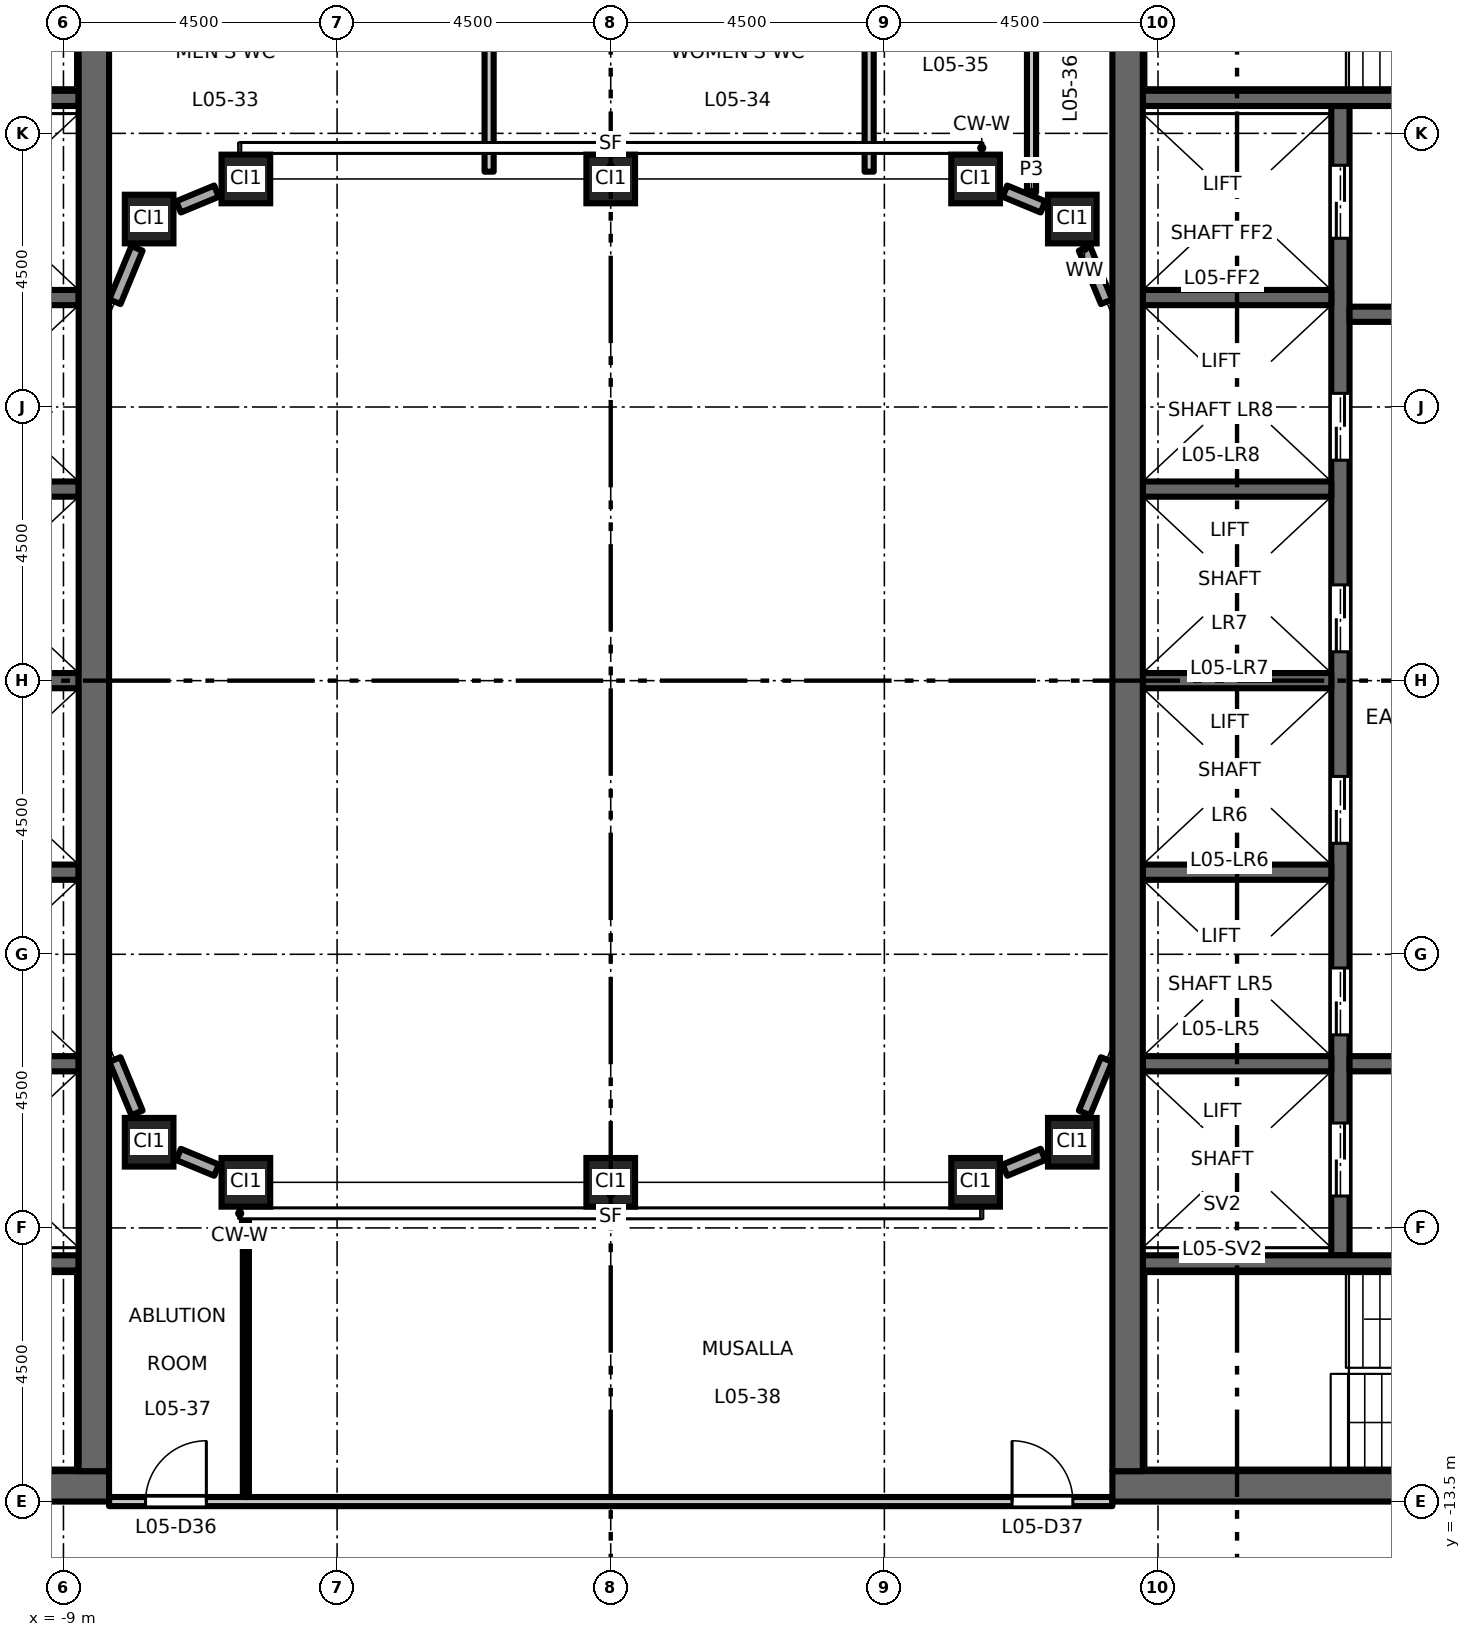
"""IFC4 building model, lengths in metres.
Left out: names, types, materials, properties, quantities, classifications, styles, units other than length and angle.
Written with IfcOpenShell. Run it as: python <this file> out.ifc"""

import sys

from ifc_helpers import new_model, si_unit, direction, frame, frame_2d, origin, origin_2d, place, context, subcontext, project, spatial, rectangle, hollow_rectangle, extrude, element, fill, save


model = new_model("IFC4")
c1 = context("Model", 3, precision=1e-05, world=origin(), true_north=direction((0.0, 1.0)))
c2 = subcontext(c1, "Body", "Model", "MODEL_VIEW")
j1 = project(units=[si_unit("LENGTHUNIT", "METRE"), si_unit("PLANEANGLEUNIT", "RADIAN")], contexts=[c1])
p1 = place(None, origin())
s1 = spatial("IfcSite", under=j1, at=p1, CompositionType="ELEMENT")
p2 = place(p1, origin())
s2 = spatial("IfcBuilding", under=s1, at=p2, CompositionType="ELEMENT")
p3 = place(p2, frame((0.0, 0.0, 26.7)))
s3 = spatial("IfcBuildingStorey", under=s2, at=p3, CompositionType="ELEMENT", Elevation=26.7)
for number, where, z_axis, x_axis in (
    (1, (-7.591, -7.591, 0.0), (0.0, 0.0, 1.0), (1.0, 0.0, 0.0)),
    (2, (-6.0, -8.25, 0.0), (0.0, 0.0, 1.0), (1.0, 0.0, 0.0)),
    (3, (0.0, -8.25, 0.0), (0.0, 0.0, 1.0), (1.0, 0.0, 0.0)),
    (4, (6.0, -8.25, 0.0), (0.0, 0.0, 1.0), (1.0, 0.0, 0.0)),
    (5, (7.591, -7.591, 0.0), (0.0, 0.0, 1.0), (1.0, 0.0, 0.0)),
    (6, (-7.591, 7.591, 0.0), (0.0, 0.0, 1.0), (1.0, 0.0, 0.0)),
    (7, (-6.0, 8.25, 0.0), (0.0, 0.0, 1.0), (1.0, 0.0, 0.0)),
    (8, (0.0, 8.25, 0.0), (0.0, 0.0, 1.0), (1.0, 0.0, 0.0)),
    (9, (6.0, 8.25, 0.0), (0.0, 0.0, 1.0), (1.0, 0.0, 0.0)),
    (10, (7.591, 7.591, 0.0), (0.0, 0.0, 1.0), (1.0, 0.0, 0.0)),
):
    element("IfcColumn", number, at=place(p3, frame(where, z_axis=z_axis, x_axis=x_axis)), inside=s3, PredefinedType="COLUMN", context=c2, shape_type="SweptSolid", body=[
        extrude(hollow_rectangle(XDim=0.8, YDim=0.8, WallThickness=0.05, at=origin_2d()), origin(), (0.0, 0.0, 1.0), 4.5),
    ])
for number, where, z_axis, x_axis in (
    (11, (-8.75, 0.0, 0.0), (0.0, 0.0, 1.0), (-1.0, 0.0, 0.0)),
    (12, (-8.75, 3.15, 0.0), (0.0, 0.0, 1.0), (-1.0, 0.0, 0.0)),
    (13, (-8.75, 6.3, 0.0), (0.0, 0.0, 1.0), (-1.0, 0.0, 0.0)),
    (14, (-8.75, -3.15, 0.0), (0.0, 0.0, 1.0), (-1.0, 0.0, 0.0)),
    (15, (-8.75, -6.3, 0.0), (0.0, 0.0, 1.0), (-1.0, 0.0, 0.0)),
):
    element("IfcWall", number, at=place(p3, frame(where, z_axis=z_axis, x_axis=x_axis)), inside=s3, PredefinedType="SHEAR", context=c2, shape_type="SweptSolid", body=[
        extrude(rectangle(XDim=3.1, YDim=0.25, at=frame_2d((1.55, 0.0))), origin(), (0.0, 0.0, 1.0), 4.35),
    ])
p4 = place(p3, frame((-8.75, 9.575, 0.0), z_axis=(0.0, 0.0, 1.0), x_axis=(-1.0, 0.0, 0.0)))
e16 = element("IfcWall", 16, at=p4, inside=s3, PredefinedType="SHEAR", context=c2, shape_type="SweptSolid", body=[
    extrude(rectangle(XDim=8.0, YDim=0.25, at=frame_2d((4.0, 0.0))), origin(), (0.0, 0.0, 1.0), 4.35),
])
p5 = place(p4, frame((6.65, 0.0, 0.0)))
e17 = element("IfcOpeningElement", 17, at=p5, cuts=e16, PredefinedType="OPENING", context=c2, shape_type="SweptSolid", body=[
    extrude(rectangle(XDim=1.1, YDim=2.1, at=frame_2d((0.55, 1.05))), frame((0.0, 0.135, 0.0), z_axis=(0.0, -1.0, 0.0), x_axis=(1.0, 0.0, 0.0)), (0.0, 0.0, 1.0), 0.27),
])
p6 = place(p3, frame((-8.75, -9.575, 0.0), z_axis=(0.0, 0.0, 1.0), x_axis=(-1.0, 0.0, 0.0)))
e18 = element("IfcWall", 18, at=p6, inside=s3, PredefinedType="SHEAR", context=c2, shape_type="SweptSolid", body=[
    extrude(rectangle(XDim=8.0, YDim=0.25, at=frame_2d((4.0, 0.0))), origin(), (0.0, 0.0, 1.0), 4.35),
])
p7 = place(p6, frame((6.65, 0.0, 0.0)))
e19 = element("IfcOpeningElement", 19, at=p7, cuts=e18, PredefinedType="OPENING", context=c2, shape_type="SweptSolid", body=[
    extrude(rectangle(XDim=1.1, YDim=2.1, at=frame_2d((0.55, 1.05))), frame((0.0, 0.135, 0.0), z_axis=(0.0, -1.0, 0.0), x_axis=(1.0, 0.0, 0.0)), (0.0, 0.0, 1.0), 0.27),
])
p8 = place(p3, frame((-8.25, -13.25, 0.0), z_axis=(0.0, 0.0, 1.0), x_axis=(-1.0, 0.0, 0.0)))
e20 = element("IfcWall", 20, at=p8, inside=s3, PredefinedType="SHEAR", context=c2, shape_type="SweptSolid", body=[
    extrude(rectangle(XDim=13.5, YDim=0.5, at=frame_2d((6.75, 0.0))), origin(), (0.0, 0.0, 1.0), 4.35),
])
p9 = place(p3, frame((-8.5, -13.0, 0.0), z_axis=(0.0, 0.0, 1.0), x_axis=(0.0, 1.0, 0.0)))
e21 = element("IfcWall", 21, at=p9, inside=s3, PredefinedType="SHEAR", context=c2, shape_type="SweptSolid", body=[
    extrude(rectangle(XDim=26.0, YDim=0.5, at=frame_2d((13.0, 0.0))), origin(), (0.0, 0.0, 1.0), 4.35),
])
p10 = place(p3, frame((12.0, -9.45, 0.0), z_axis=(0.0, 0.0, 1.0), x_axis=(0.0, 1.0, 0.0)))
e22 = element("IfcWall", 22, at=p10, inside=s3, PredefinedType="SHEAR", context=c2, shape_type="SweptSolid", body=[
    extrude(rectangle(XDim=18.9, YDim=0.3, at=frame_2d((9.45, 0.0))), origin(), (0.0, 0.0, 1.0), 4.35),
])
p11 = place(p10, frame((3.625, 0.0, 0.0)))
e23 = element("IfcOpeningElement", 23, at=p11, cuts=e22, PredefinedType="OPENING", context=c2, shape_type="SweptSolid", body=[
    extrude(rectangle(XDim=1.1, YDim=2.1, at=frame_2d((0.55, 1.05))), frame((0.0, 0.16, 0.0), z_axis=(0.0, -1.0, 0.0), x_axis=(1.0, 0.0, 0.0)), (0.0, 0.0, 1.0), 0.32),
])
p12 = place(p10, frame((6.775, 0.0, 0.0)))
e24 = element("IfcOpeningElement", 24, at=p12, cuts=e22, PredefinedType="OPENING", context=c2, shape_type="SweptSolid", body=[
    extrude(rectangle(XDim=1.1, YDim=2.1, at=frame_2d((0.55, 1.05))), frame((0.0, 0.16, 0.0), z_axis=(0.0, -1.0, 0.0), x_axis=(1.0, 0.0, 0.0)), (0.0, 0.0, 1.0), 0.32),
])
p13 = place(p10, frame((9.925, 0.0, 0.0)))
e25 = element("IfcOpeningElement", 25, at=p13, cuts=e22, PredefinedType="OPENING", context=c2, shape_type="SweptSolid", body=[
    extrude(rectangle(XDim=1.1, YDim=2.1, at=frame_2d((0.55, 1.05))), frame((0.0, 0.16, 0.0), z_axis=(0.0, -1.0, 0.0), x_axis=(1.0, 0.0, 0.0)), (0.0, 0.0, 1.0), 0.32),
])
p14 = place(p10, frame((13.075, 0.0, 0.0)))
e26 = element("IfcOpeningElement", 26, at=p14, cuts=e22, PredefinedType="OPENING", context=c2, shape_type="SweptSolid", body=[
    extrude(rectangle(XDim=1.1, YDim=2.1, at=frame_2d((0.55, 1.05))), frame((0.0, 0.16, 0.0), z_axis=(0.0, -1.0, 0.0), x_axis=(1.0, 0.0, 0.0)), (0.0, 0.0, 1.0), 0.32),
])
p15 = place(p10, frame((16.725, 0.0, 0.0)))
e27 = element("IfcOpeningElement", 27, at=p15, cuts=e22, PredefinedType="OPENING", context=c2, shape_type="SweptSolid", body=[
    extrude(rectangle(XDim=1.2, YDim=2.1, at=frame_2d((0.6, 1.05))), frame((0.0, 0.16, 0.0), z_axis=(0.0, -1.0, 0.0), x_axis=(1.0, 0.0, 0.0)), (0.0, 0.0, 1.0), 0.32),
])
p16 = place(p10, frame((0.975, 0.0, 0.0)))
e28 = element("IfcOpeningElement", 28, at=p16, cuts=e22, PredefinedType="OPENING", context=c2, shape_type="SweptSolid", body=[
    extrude(rectangle(XDim=1.2, YDim=2.1, at=frame_2d((0.6, 1.05))), frame((0.0, 0.16, 0.0), z_axis=(0.0, -1.0, 0.0), x_axis=(1.0, 0.0, 0.0)), (0.0, 0.0, 1.0), 0.32),
])
p17 = place(p3, frame((12.15, 6.025, 0.0), z_axis=(0.0, 0.0, 1.0), x_axis=(1.0, 0.0, 0.0)))
e29 = element("IfcWall", 29, at=p17, inside=s3, PredefinedType="SHEAR", context=c2, shape_type="SweptSolid", body=[
    extrude(rectangle(XDim=4.6, YDim=0.25, at=frame_2d((2.3, 0.0))), origin(), (0.0, 0.0, 1.0), 4.35),
])
p18 = place(p17, frame((1.8, 0.0, 0.0)))
e30 = element("IfcOpeningElement", 30, at=p18, cuts=e29, PredefinedType="OPENING", context=c2, shape_type="SweptSolid", body=[
    extrude(rectangle(XDim=1.0, YDim=2.1, at=frame_2d((0.5, 1.05))), frame((0.0, 0.135, 0.0), z_axis=(0.0, -1.0, 0.0), x_axis=(1.0, 0.0, 0.0)), (0.0, 0.0, 1.0), 0.27),
])
p19 = place(p3, frame((12.15, -6.3, 0.0), z_axis=(0.0, 0.0, 1.0), x_axis=(1.0, 0.0, 0.0)))
e31 = element("IfcWall", 31, at=p19, inside=s3, PredefinedType="SHEAR", context=c2, shape_type="SweptSolid", body=[
    extrude(rectangle(XDim=9.1, YDim=0.25, at=frame_2d((4.55, 0.0))), origin(), (0.0, 0.0, 1.0), 4.35),
])
p20 = place(p19, frame((1.8, 0.0, 0.0)))
e32 = element("IfcOpeningElement", 32, at=p20, cuts=e31, PredefinedType="OPENING", context=c2, shape_type="SweptSolid", body=[
    extrude(rectangle(XDim=1.0, YDim=2.1, at=frame_2d((0.5, 1.05))), frame((0.0, 0.135, 0.0), z_axis=(0.0, -1.0, 0.0), x_axis=(1.0, 0.0, 0.0)), (0.0, 0.0, 1.0), 0.27),
])
p21 = place(p19, frame((6.65, 0.0, 0.0)))
e33 = element("IfcOpeningElement", 33, at=p21, cuts=e31, PredefinedType="OPENING", context=c2, shape_type="SweptSolid", body=[
    extrude(rectangle(XDim=0.9, YDim=2.1, at=frame_2d((0.45, 1.05))), frame((0.0, 0.135, 0.0), z_axis=(0.0, -1.0, 0.0), x_axis=(1.0, 0.0, 0.0)), (0.0, 0.0, 1.0), 0.27),
])
for number, where, z_axis, x_axis in (
    (34, (8.75, 0.0, 0.0), (0.0, 0.0, 1.0), (1.0, 0.0, 0.0)),
    (35, (8.75, 3.15, 0.0), (0.0, 0.0, 1.0), (1.0, 0.0, 0.0)),
    (36, (8.75, 6.3, 0.0), (0.0, 0.0, 1.0), (1.0, 0.0, 0.0)),
    (37, (8.75, -3.15, 0.0), (0.0, 0.0, 1.0), (1.0, 0.0, 0.0)),
    (38, (8.75, -6.3, 0.0), (0.0, 0.0, 1.0), (1.0, 0.0, 0.0)),
):
    element("IfcWall", number, at=place(p3, frame(where, z_axis=z_axis, x_axis=x_axis)), inside=s3, PredefinedType="SHEAR", context=c2, shape_type="SweptSolid", body=[
        extrude(rectangle(XDim=3.1, YDim=0.25, at=frame_2d((1.55, 0.0))), origin(), (0.0, 0.0, 1.0), 4.35),
    ])
p22 = place(p3, frame((8.75, 9.575, 0.0), z_axis=(0.0, 0.0, 1.0), x_axis=(1.0, 0.0, 0.0)))
e39 = element("IfcWall", 39, at=p22, inside=s3, PredefinedType="SHEAR", context=c2, shape_type="SweptSolid", body=[
    extrude(rectangle(XDim=8.0, YDim=0.25, at=frame_2d((4.0, 0.0))), origin(), (0.0, 0.0, 1.0), 4.35),
])
p23 = place(p22, frame((6.65, 0.0, 0.0)))
e40 = element("IfcOpeningElement", 40, at=p23, cuts=e39, PredefinedType="OPENING", context=c2, shape_type="SweptSolid", body=[
    extrude(rectangle(XDim=1.1, YDim=2.1, at=frame_2d((0.55, 1.05))), frame((0.0, 0.135, 0.0), z_axis=(0.0, -1.0, 0.0), x_axis=(1.0, 0.0, 0.0)), (0.0, 0.0, 1.0), 0.27),
])
p24 = place(p3, frame((8.75, -9.575, 0.0), z_axis=(0.0, 0.0, 1.0), x_axis=(1.0, 0.0, 0.0)))
e41 = element("IfcWall", 41, at=p24, inside=s3, PredefinedType="SHEAR", context=c2, shape_type="SweptSolid", body=[
    extrude(rectangle(XDim=8.0, YDim=0.25, at=frame_2d((4.0, 0.0))), origin(), (0.0, 0.0, 1.0), 4.35),
])
p25 = place(p24, frame((6.65, 0.0, 0.0)))
e42 = element("IfcOpeningElement", 42, at=p25, cuts=e41, PredefinedType="OPENING", context=c2, shape_type="SweptSolid", body=[
    extrude(rectangle(XDim=1.1, YDim=2.1, at=frame_2d((0.55, 1.05))), frame((0.0, 0.135, 0.0), z_axis=(0.0, -1.0, 0.0), x_axis=(1.0, 0.0, 0.0)), (0.0, 0.0, 1.0), 0.27),
])
p26 = place(p3, frame((8.25, -13.25, 0.0), z_axis=(0.0, 0.0, 1.0), x_axis=(1.0, 0.0, 0.0)))
e43 = element("IfcWall", 43, at=p26, inside=s3, PredefinedType="SHEAR", context=c2, shape_type="SweptSolid", body=[
    extrude(rectangle(XDim=13.5, YDim=0.5, at=frame_2d((6.75, 0.0))), origin(), (0.0, 0.0, 1.0), 4.35),
])
p27 = place(p3, frame((8.5, -13.0, 0.0), z_axis=(0.0, 0.0, 1.0), x_axis=(0.0, 1.0, 0.0)))
e44 = element("IfcWall", 44, at=p27, inside=s3, PredefinedType="SHEAR", context=c2, shape_type="SweptSolid", body=[
    extrude(rectangle(XDim=26.0, YDim=0.5, at=frame_2d((13.0, 0.0))), origin(), (0.0, 0.0, 1.0), 4.35),
])
p28 = place(p3, frame((6.483, -8.05, 0.0), z_axis=(0.0, 0.0, 1.0), x_axis=(0.923854141361, 0.382744726273, 0.0)))
e45 = element("IfcWall", 45, at=p28, inside=s3, PredefinedType="STANDARD", context=c2, shape_type="SweptSolid", body=[
    extrude(rectangle(XDim=0.677, YDim=0.2, at=frame_2d((0.338, 0.0))), origin(), (0.0, 0.0, 1.0), 3.73),
])
for number, where, z_axis, x_axis in (
    (46, (7.791, -7.108, 0.0), (0.0, 0.0, 1.0), (0.383, 0.924, 0.0)),
    (47, (8.154, 6.231, 0.0), (0.0, 0.0, 1.0), (-0.383, 0.924, 0.0)),
):
    element("IfcWall", number, at=place(p3, frame(where, z_axis=z_axis, x_axis=x_axis)), inside=s3, PredefinedType="STANDARD", context=c2, shape_type="SweptSolid", body=[
        extrude(rectangle(XDim=0.949, YDim=0.2, at=frame_2d((0.475, 0.0))), origin(), (0.0, 0.0, 1.0), 3.73),
    ])
for number, where, z_axis, x_axis in (
    (48, (7.108, 7.791, 0.0), (0.0, 0.0, 1.0), (-0.924, 0.383, 0.0)),
    (49, (-6.483, 8.05, 0.0), (0.0, 0.0, 1.0), (-0.924, -0.383, 0.0)),
):
    element("IfcWall", number, at=place(p3, frame(where, z_axis=z_axis, x_axis=x_axis)), inside=s3, PredefinedType="STANDARD", context=c2, shape_type="SweptSolid", body=[
        extrude(rectangle(XDim=0.677, YDim=0.2, at=frame_2d((0.338, 0.0))), origin(), (0.0, 0.0, 1.0), 3.73),
    ])
for number, where, z_axis, x_axis in (
    (50, (-7.791, 7.108, 0.0), (0.0, 0.0, 1.0), (-0.383, -0.924, 0.0)),
    (51, (-8.154, -6.231, 0.0), (0.0, 0.0, 1.0), (0.383, -0.924, 0.0)),
):
    element("IfcWall", number, at=place(p3, frame(where, z_axis=z_axis, x_axis=x_axis)), inside=s3, PredefinedType="STANDARD", context=c2, shape_type="SweptSolid", body=[
        extrude(rectangle(XDim=0.949, YDim=0.2, at=frame_2d((0.475, 0.0))), origin(), (0.0, 0.0, 1.0), 3.73),
    ])
p29 = place(p3, frame((-7.108, -7.791, 0.0), z_axis=(0.0, 0.0, 1.0), x_axis=(0.923854141361, -0.382744726273, 0.0)))
e52 = element("IfcWall", 52, at=p29, inside=s3, PredefinedType="STANDARD", context=c2, shape_type="SweptSolid", body=[
    extrude(rectangle(XDim=0.677, YDim=0.2, at=frame_2d((0.338, 0.0))), origin(), (0.0, 0.0, 1.0), 3.73),
])
p30 = place(p3, frame((-8.25, -13.5, 0.0), z_axis=(0.0, 0.0, 1.0), x_axis=(1.0, 0.0, 0.0)))
e53 = element("IfcWall", 53, at=p30, inside=s3, PredefinedType="PARTITIONING", context=c2, shape_type="SweptSolid", body=[
    extrude(rectangle(XDim=16.5, YDim=0.15, at=frame_2d((8.25, 0.0))), origin(), (0.0, 0.0, 1.0), 3.85),
])
p31 = place(p30, frame((0.6, 0.0, 0.0)))
e54 = element("IfcOpeningElement", 54, at=p31, cuts=e53, PredefinedType="OPENING", context=c2, shape_type="SweptSolid", body=[
    extrude(rectangle(XDim=1.0, YDim=2.1, at=frame_2d((0.5, 1.05))), frame((0.0, 0.085, 0.0), z_axis=(0.0, -1.0, 0.0), x_axis=(1.0, 0.0, 0.0)), (0.0, 0.0, 1.0), 0.17),
])
p32 = place(p30, frame((14.85, 0.0, 0.0)))
e55 = element("IfcOpeningElement", 55, at=p32, cuts=e53, PredefinedType="OPENING", context=c2, shape_type="SweptSolid", body=[
    extrude(rectangle(XDim=1.0, YDim=2.1, at=frame_2d((0.5, 1.05))), frame((0.0, 0.085, 0.0), z_axis=(0.0, -1.0, 0.0), x_axis=(1.0, 0.0, 0.0)), (0.0, 0.0, 1.0), 0.17),
])
p33 = place(p3, frame((-6.0, -13.425, 0.0), z_axis=(0.0, 0.0, 1.0), x_axis=(0.0, 1.0, 0.0)))
e56 = element("IfcWall", 56, at=p33, inside=s3, PredefinedType="PARTITIONING", context=c2, shape_type="SweptSolid", body=[
    extrude(rectangle(XDim=4.725, YDim=0.1, at=frame_2d((2.363, 0.0))), origin(), (0.0, 0.0, 1.0), 4.35),
])
for number, where, z_axis, x_axis in (
    (57, (-2.0, 8.37, 0.0), (0.0, 0.0, 1.0), (0.0, 1.0, 0.0)),
    (58, (4.25, 8.37, 0.0), (0.0, 0.0, 1.0), (0.0, 1.0, 0.0)),
):
    element("IfcWall", number, at=place(p3, frame(where, z_axis=z_axis, x_axis=x_axis)), inside=s3, PredefinedType="PARTITIONING", context=c2, shape_type="SweptSolid", body=[
        extrude(rectangle(XDim=2.855, YDim=0.15, at=frame_2d((1.427, 0.0))), origin(), (0.0, 0.0, 1.0), 4.35),
    ])
p34 = place(p3, frame((6.92, 8.028, 0.0), z_axis=(0.0, 0.0, 1.0), x_axis=(0.0, 1.0, 0.0)))
e59 = element("IfcWall", 59, at=p34, inside=s3, PredefinedType="PARTITIONING", context=c2, shape_type="SweptSolid", body=[
    extrude(rectangle(XDim=3.197, YDim=0.15, at=frame_2d((1.599, 0.0))), origin(), (0.0, 0.0, 1.0), 4.35),
])
p35 = place(p11, origin())
e60 = element("IfcDoor", 60, at=p35, inside=s3, OperationType="DOUBLE_DOOR_SLIDING", PredefinedType="DOOR", context=c2, shape_type="SweptSolid", body=[
    extrude(rectangle(XDim=1.1, YDim=2.1, at=frame_2d((0.55, 1.05))), frame((0.0, 0.025, 0.0), z_axis=(0.0, -1.0, 0.0), x_axis=(1.0, 0.0, 0.0)), (0.0, 0.0, 1.0), 0.05),
])
fill(e23, e60)
p36 = place(p12, origin())
e61 = element("IfcDoor", 61, at=p36, inside=s3, OperationType="DOUBLE_DOOR_SLIDING", PredefinedType="DOOR", context=c2, shape_type="SweptSolid", body=[
    extrude(rectangle(XDim=1.1, YDim=2.1, at=frame_2d((0.55, 1.05))), frame((0.0, 0.025, 0.0), z_axis=(0.0, -1.0, 0.0), x_axis=(1.0, 0.0, 0.0)), (0.0, 0.0, 1.0), 0.05),
])
fill(e24, e61)
p37 = place(p13, origin())
e62 = element("IfcDoor", 62, at=p37, inside=s3, OperationType="DOUBLE_DOOR_SLIDING", PredefinedType="DOOR", context=c2, shape_type="SweptSolid", body=[
    extrude(rectangle(XDim=1.1, YDim=2.1, at=frame_2d((0.55, 1.05))), frame((0.0, 0.025, 0.0), z_axis=(0.0, -1.0, 0.0), x_axis=(1.0, 0.0, 0.0)), (0.0, 0.0, 1.0), 0.05),
])
fill(e25, e62)
p38 = place(p14, origin())
e63 = element("IfcDoor", 63, at=p38, inside=s3, OperationType="DOUBLE_DOOR_SLIDING", PredefinedType="DOOR", context=c2, shape_type="SweptSolid", body=[
    extrude(rectangle(XDim=1.1, YDim=2.1, at=frame_2d((0.55, 1.05))), frame((0.0, 0.025, 0.0), z_axis=(0.0, -1.0, 0.0), x_axis=(1.0, 0.0, 0.0)), (0.0, 0.0, 1.0), 0.05),
])
fill(e26, e63)
p39 = place(p15, origin())
e64 = element("IfcDoor", 64, at=p39, inside=s3, OperationType="DOUBLE_DOOR_SLIDING", PredefinedType="DOOR", context=c2, shape_type="SweptSolid", body=[
    extrude(rectangle(XDim=1.2, YDim=2.1, at=frame_2d((0.6, 1.05))), frame((0.0, 0.025, 0.0), z_axis=(0.0, -1.0, 0.0), x_axis=(1.0, 0.0, 0.0)), (0.0, 0.0, 1.0), 0.05),
])
fill(e27, e64)
p40 = place(p16, origin())
e65 = element("IfcDoor", 65, at=p40, inside=s3, OperationType="DOUBLE_DOOR_SLIDING", PredefinedType="DOOR", context=c2, shape_type="SweptSolid", body=[
    extrude(rectangle(XDim=1.2, YDim=2.1, at=frame_2d((0.6, 1.05))), frame((0.0, 0.025, 0.0), z_axis=(0.0, -1.0, 0.0), x_axis=(1.0, 0.0, 0.0)), (0.0, 0.0, 1.0), 0.05),
])
fill(e28, e65)
p41 = place(p31, origin())
e66 = element("IfcDoor", 66, at=p41, inside=s3, OperationType="SINGLE_SWING_RIGHT", PredefinedType="DOOR", context=c2, shape_type="SweptSolid", body=[
    extrude(rectangle(XDim=1.0, YDim=2.1, at=frame_2d((0.5, 1.05))), frame((0.0, 0.025, 0.0), z_axis=(0.0, -1.0, 0.0), x_axis=(1.0, 0.0, 0.0)), (0.0, 0.0, 1.0), 0.05),
])
fill(e54, e66)
p42 = place(p32, origin())
e67 = element("IfcDoor", 67, at=p42, inside=s3, OperationType="SINGLE_SWING_LEFT", PredefinedType="DOOR", context=c2, shape_type="SweptSolid", body=[
    extrude(rectangle(XDim=1.0, YDim=2.1, at=frame_2d((0.5, 1.05))), frame((0.0, 0.025, 0.0), z_axis=(0.0, -1.0, 0.0), x_axis=(1.0, 0.0, 0.0)), (0.0, 0.0, 1.0), 0.05),
])
fill(e55, e67)
save(model, sys.argv[1])
